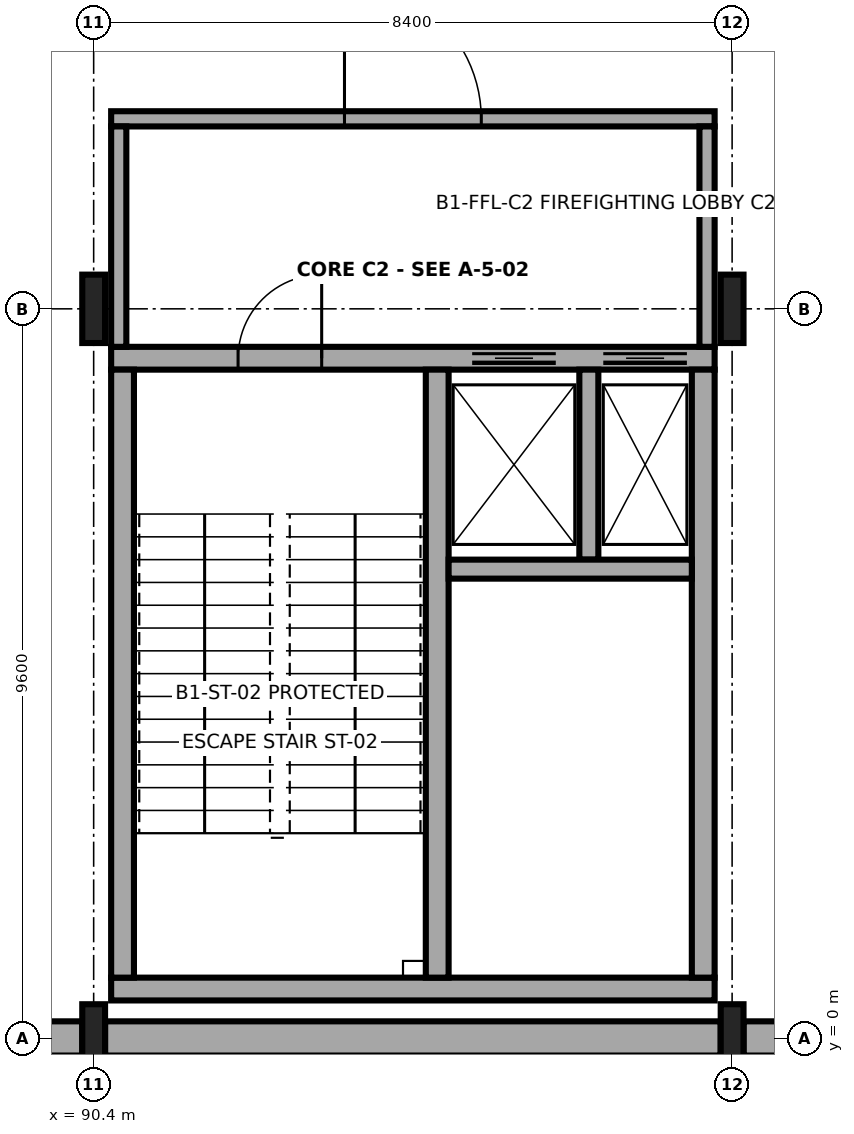
"""IFC4 building model, lengths in metres.
Left out: names, types, materials, properties, quantities, classifications, styles, units other than length and angle.
Written with IfcOpenShell. Run it as: python <this file> out.ifc"""

import sys

from ifc_helpers import new_model, si_unit, direction, frame, frame_2d, origin, origin_2d, place, context, subcontext, project, spatial, rectangle, i_section, extrude, element, fill, save


model = new_model("IFC4")
c1 = context("Model", 3, precision=1e-05, world=origin(), true_north=direction((0.0, 1.0)))
c2 = subcontext(c1, "Body", "Model", "MODEL_VIEW")
j1 = project(units=[si_unit("LENGTHUNIT", "METRE"), si_unit("PLANEANGLEUNIT", "RADIAN")], contexts=[c1])
p1 = place(None, origin())
s1 = spatial("IfcSite", under=j1, at=p1, CompositionType="ELEMENT")
p2 = place(p1, origin())
s2 = spatial("IfcBuilding", under=s1, at=p2, CompositionType="ELEMENT")
p3 = place(p2, frame((0.0, 0.0, -4.8)))
s3 = spatial("IfcBuildingStorey", under=s2, at=p3, CompositionType="ELEMENT", Elevation=-4.8)
for number, where, z_axis, x_axis in (
    (1, (90.4, 0.0, 0.0), (0.0, 0.0, 1.0), (1.0, 0.0, 0.0)),
    (2, (90.4, 9.6, 0.0), (0.0, 0.0, 1.0), (1.0, 0.0, 0.0)),
    (3, (98.8, 0.0, 0.0), (0.0, 0.0, 1.0), (1.0, 0.0, 0.0)),
    (4, (98.8, 9.6, 0.0), (0.0, 0.0, 1.0), (1.0, 0.0, 0.0)),
):
    element("IfcColumn", number, at=place(p3, frame(where, z_axis=z_axis, x_axis=x_axis)), inside=s3, PredefinedType="COLUMN", context=c2, shape_type="SweptSolid", body=[
        extrude(i_section(OverallWidth=0.3, OverallDepth=0.9, WebThickness=0.019, FlangeThickness=0.035, FilletRadius=0.03, at=origin_2d()), origin(), (0.0, 0.0, 1.0), 4.8),
    ])
p4 = place(p3, frame((107.05, 0.0, 0.0), z_axis=(0.0, 0.0, 1.0), x_axis=(-1.0, 0.0, 0.0)))
e5 = element("IfcWall", 5, at=p4, inside=s3, PredefinedType="USERDEFINED", context=c2, shape_type="SweptSolid", body=[
    extrude(rectangle(XDim=8.1, YDim=0.45, at=frame_2d((4.05, 0.0))), origin(), (0.0, 0.0, 1.0), 4.48),
])
p5 = place(p3, frame((98.65, 0.0, 0.0), z_axis=(0.0, 0.0, 1.0), x_axis=(-1.0, 0.0, 0.0)))
e6 = element("IfcWall", 6, at=p5, inside=s3, PredefinedType="USERDEFINED", context=c2, shape_type="SweptSolid", body=[
    extrude(rectangle(XDim=8.1, YDim=0.45, at=frame_2d((4.05, 0.0))), origin(), (0.0, 0.0, 1.0), 4.48),
])
p6 = place(p3, frame((90.25, 0.0, 0.0), z_axis=(0.0, 0.0, 1.0), x_axis=(-1.0, 0.0, 0.0)))
e7 = element("IfcWall", 7, at=p6, inside=s3, PredefinedType="USERDEFINED", context=c2, shape_type="SweptSolid", body=[
    extrude(rectangle(XDim=8.1, YDim=0.45, at=frame_2d((4.05, 0.0))), origin(), (0.0, 0.0, 1.0), 4.48),
])
p7 = place(p3, frame((90.63, 0.65, 0.0), z_axis=(0.0, 0.0, 1.0), x_axis=(1.0, 0.0, 0.0)))
e8 = element("IfcWall", 8, at=p7, inside=s3, PredefinedType="SHEAR", context=c2, shape_type="SweptSolid", body=[
    extrude(rectangle(XDim=7.94, YDim=0.3, at=frame_2d((3.97, 0.0))), origin(), (0.0, 0.0, 1.0), 4.5),
])
p8 = place(p3, frame((98.57, 8.95, 0.0), z_axis=(0.0, 0.0, 1.0), x_axis=(-1.0, 0.0, 0.0)))
e9 = element("IfcWall", 9, at=p8, inside=s3, PredefinedType="SHEAR", context=c2, shape_type="SweptSolid", body=[
    extrude(rectangle(XDim=7.94, YDim=0.3, at=frame_2d((3.97, 0.0))), origin(), (0.0, 0.0, 1.0), 4.5),
])
p9 = place(p8, frame((5.17, 0.0, 0.0)))
e10 = element("IfcOpeningElement", 10, at=p9, cuts=e9, PredefinedType="OPENING", context=c2, shape_type="SweptSolid", body=[
    extrude(rectangle(XDim=1.1, YDim=2.2, at=frame_2d((0.55, 1.1))), frame((0.0, 0.16, 0.0), z_axis=(0.0, -1.0, 0.0), x_axis=(1.0, 0.0, 0.0)), (0.0, 0.0, 1.0), 0.32),
])
p10 = place(p8, frame((2.09, 0.0, 0.0)))
e11 = element("IfcOpeningElement", 11, at=p10, cuts=e9, PredefinedType="OPENING", context=c2, shape_type="SweptSolid", body=[
    extrude(rectangle(XDim=1.1, YDim=2.1, at=frame_2d((0.55, 1.05))), frame((0.0, 0.16, 0.0), z_axis=(0.0, -1.0, 0.0), x_axis=(1.0, 0.0, 0.0)), (0.0, 0.0, 1.0), 0.32),
])
p11 = place(p8, frame((0.365, 0.0, 0.0)))
e12 = element("IfcOpeningElement", 12, at=p11, cuts=e9, PredefinedType="OPENING", context=c2, shape_type="SweptSolid", body=[
    extrude(rectangle(XDim=1.1, YDim=2.1, at=frame_2d((0.55, 1.05))), frame((0.0, 0.16, 0.0), z_axis=(0.0, -1.0, 0.0), x_axis=(1.0, 0.0, 0.0)), (0.0, 0.0, 1.0), 0.32),
])
for number, where, z_axis, x_axis in (
    (13, (90.78, 8.8, 0.0), (0.0, 0.0, 1.0), (0.0, -1.0, 0.0)),
    (14, (98.42, 0.8, 0.0), (0.0, 0.0, 1.0), (0.0, 1.0, 0.0)),
    (15, (94.92, 0.8, 0.0), (0.0, 0.0, 1.0), (0.0, 1.0, 0.0)),
):
    element("IfcWall", number, at=place(p3, frame(where, z_axis=z_axis, x_axis=x_axis)), inside=s3, PredefinedType="SHEAR", context=c2, shape_type="SweptSolid", body=[
        extrude(rectangle(XDim=8.0, YDim=0.3, at=frame_2d((4.0, 0.0))), origin(), (0.0, 0.0, 1.0), 4.5),
    ])
p12 = place(p3, frame((96.915, 6.3, 0.0), z_axis=(0.0, 0.0, 1.0), x_axis=(0.0, 1.0, 0.0)))
e16 = element("IfcWall", 16, at=p12, inside=s3, PredefinedType="SHEAR", context=c2, shape_type="SweptSolid", body=[
    extrude(rectangle(XDim=2.5, YDim=0.25, at=frame_2d((1.25, 0.0))), origin(), (0.0, 0.0, 1.0), 4.5),
])
p13 = place(p3, frame((95.07, 6.175, 0.0), z_axis=(0.0, 0.0, 1.0), x_axis=(1.0, 0.0, 0.0)))
e17 = element("IfcWall", 17, at=p13, inside=s3, PredefinedType="SHEAR", context=c2, shape_type="SweptSolid", body=[
    extrude(rectangle(XDim=3.2, YDim=0.25, at=frame_2d((1.6, 0.0))), origin(), (0.0, 0.0, 1.0), 4.5),
])
p14 = place(p3, frame((90.63, 12.1, 0.0), z_axis=(0.0, 0.0, 1.0), x_axis=(1.0, 0.0, 0.0)))
e18 = element("IfcWall", 18, at=p14, inside=s3, PredefinedType="SOLIDWALL", context=c2, shape_type="SweptSolid", body=[
    extrude(rectangle(XDim=7.94, YDim=0.2, at=frame_2d((3.97, 0.0))), origin(), (0.0, 0.0, 1.0), 4.132),
])
p15 = place(p14, frame((3.07, 0.0, 0.0)))
e19 = element("IfcOpeningElement", 19, at=p15, cuts=e18, PredefinedType="OPENING", context=c2, shape_type="SweptSolid", body=[
    extrude(rectangle(XDim=1.8, YDim=2.2, at=frame_2d((0.9, 1.1))), frame((0.0, 0.11, 0.0), z_axis=(0.0, -1.0, 0.0), x_axis=(1.0, 0.0, 0.0)), (0.0, 0.0, 1.0), 0.22),
])
for number, where, z_axis, x_axis in (
    (20, (90.73, 9.1, 0.0), (0.0, 0.0, 1.0), (0.0, 1.0, 0.0)),
    (21, (98.47, 12.0, 0.0), (0.0, 0.0, 1.0), (0.0, -1.0, 0.0)),
):
    element("IfcWall", number, at=place(p3, frame(where, z_axis=z_axis, x_axis=x_axis)), inside=s3, PredefinedType="SOLIDWALL", context=c2, shape_type="SweptSolid", body=[
        extrude(rectangle(XDim=2.9, YDim=0.2, at=frame_2d((1.45, 0.0))), origin(), (0.0, 0.0, 1.0), 3.832),
    ])
p16 = place(p9, origin())
e22 = element("IfcDoor", 22, at=p16, inside=s3, OperationType="SINGLE_SWING_RIGHT", PredefinedType="DOOR", context=c2, shape_type="SweptSolid", body=[
    extrude(rectangle(XDim=1.1, YDim=2.2, at=frame_2d((0.55, 1.1))), frame((0.0, 0.025, 0.0), z_axis=(0.0, -1.0, 0.0), x_axis=(1.0, 0.0, 0.0)), (0.0, 0.0, 1.0), 0.05),
])
fill(e10, e22)
p17 = place(p10, origin())
e23 = element("IfcDoor", 23, at=p17, inside=s3, OperationType="SLIDING_TO_LEFT", PredefinedType="DOOR", context=c2, shape_type="SweptSolid", body=[
    extrude(rectangle(XDim=1.1, YDim=2.1, at=frame_2d((0.55, 1.05))), frame((0.0, 0.025, 0.0), z_axis=(0.0, -1.0, 0.0), x_axis=(1.0, 0.0, 0.0)), (0.0, 0.0, 1.0), 0.05),
])
fill(e11, e23)
p18 = place(p11, origin())
e24 = element("IfcDoor", 24, at=p18, inside=s3, OperationType="SLIDING_TO_LEFT", PredefinedType="DOOR", context=c2, shape_type="SweptSolid", body=[
    extrude(rectangle(XDim=1.1, YDim=2.1, at=frame_2d((0.55, 1.05))), frame((0.0, 0.025, 0.0), z_axis=(0.0, -1.0, 0.0), x_axis=(1.0, 0.0, 0.0)), (0.0, 0.0, 1.0), 0.05),
])
fill(e12, e24)
p19 = place(p15, origin())
e25 = element("IfcDoor", 25, at=p19, inside=s3, OperationType="DOUBLE_DOOR_SINGLE_SWING", PredefinedType="DOOR", context=c2, shape_type="SweptSolid", body=[
    extrude(rectangle(XDim=1.8, YDim=2.2, at=frame_2d((0.9, 1.1))), frame((0.0, 0.025, 0.0), z_axis=(0.0, -1.0, 0.0), x_axis=(1.0, 0.0, 0.0)), (0.0, 0.0, 1.0), 0.05),
])
fill(e19, e25)
save(model, sys.argv[1])
